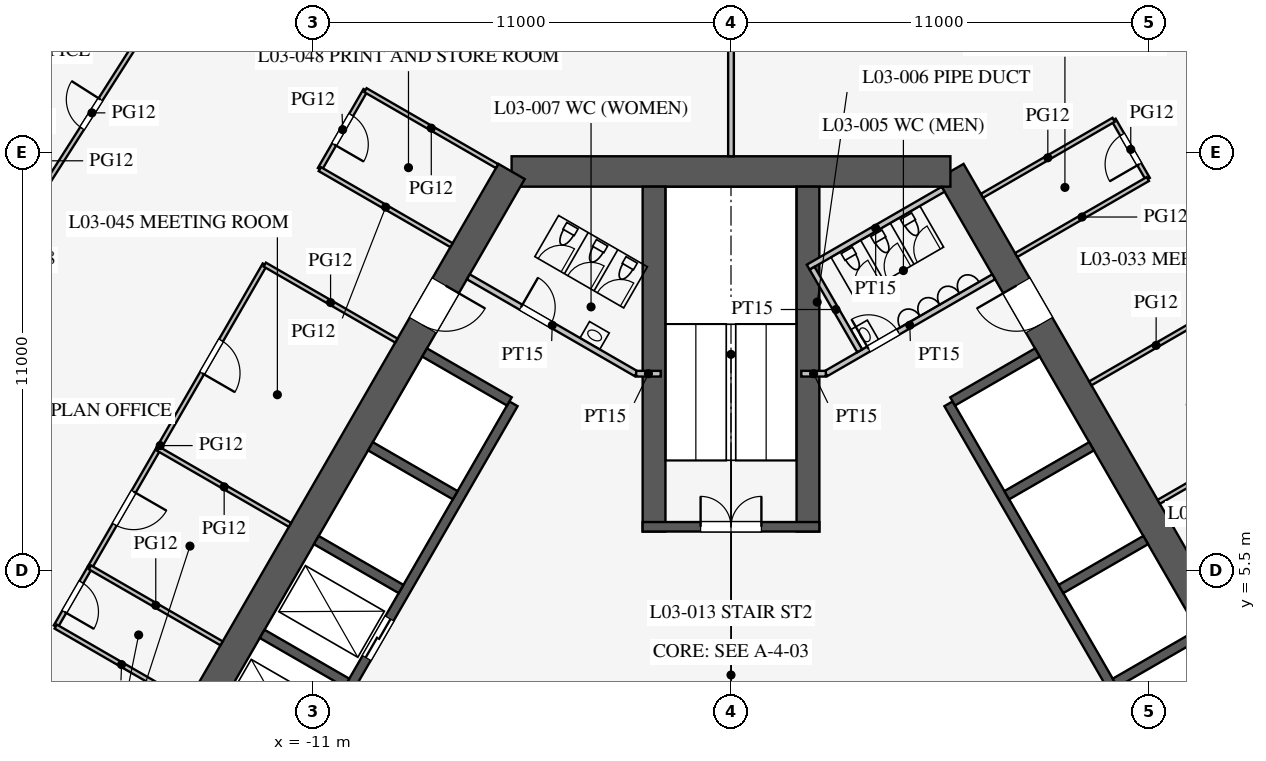
"""IFC4 building model, lengths in metres.
Left out: names, types, materials, properties, quantities, classifications, styles, units other than length and angle.
Written with IfcOpenShell. Run it as: python <this file> out.ifc"""

import sys

from ifc_helpers import new_model, si_unit, direction, frame, frame_2d, origin, place, context, subcontext, project, spatial, rectangle, extrude, element, fill, save


model = new_model("IFC4")
c1 = context("Model", 3, precision=1e-05, world=origin(), true_north=direction((0.0, 1.0)))
c2 = subcontext(c1, "Body", "Model", "MODEL_VIEW")
j1 = project(units=[si_unit("LENGTHUNIT", "METRE"), si_unit("PLANEANGLEUNIT", "RADIAN")], contexts=[c1])
p1 = place(None, origin())
s1 = spatial("IfcSite", under=j1, at=p1, CompositionType="ELEMENT")
p2 = place(p1, origin())
s2 = spatial("IfcBuilding", under=s1, at=p2, CompositionType="ELEMENT")
p3 = place(p2, frame((0.0, 0.0, 16.5)))
s3 = spatial("IfcBuildingStorey", under=s2, at=p3, CompositionType="ELEMENT", Elevation=16.5)
p4 = place(p3, frame((16.743, -3.0, 0.0), z_axis=(0.0, 0.0, 1.0), x_axis=(-0.500002442456, 0.866023993627, 0.0)))
e1 = element("IfcWall", 1, at=p4, inside=s3, PredefinedType="SHEAR", context=c2, shape_type="SweptSolid", body=[
    extrude(rectangle(XDim=21.939, YDim=0.8, at=frame_2d((10.97, 0.0))), origin(), (0.0, 0.0, 1.0), 4.2),
])
p5 = place(p4, frame((17.27, 0.0, 0.0)))
e2 = element("IfcOpeningElement", 2, at=p5, cuts=e1, PredefinedType="OPENING", context=c2, shape_type="SweptSolid", body=[
    extrude(rectangle(XDim=1.2, YDim=2.1, at=frame_2d((0.6, 1.05))), frame((0.0, 0.41, 0.0), z_axis=(0.0, -1.0, 0.0), x_axis=(1.0, 0.0, 0.0)), (0.0, 0.0, 1.0), 0.82),
])
p6 = place(p4, frame((3.47, 0.0, 0.0)))
e3 = element("IfcOpeningElement", 3, at=p6, cuts=e1, PredefinedType="OPENING", context=c2, shape_type="SweptSolid", body=[
    extrude(rectangle(XDim=1.2, YDim=2.1, at=frame_2d((0.6, 1.05))), frame((0.0, 0.41, 0.0), z_axis=(0.0, -1.0, 0.0), x_axis=(1.0, 0.0, 0.0)), (0.0, 0.0, 1.0), 0.82),
])
p7 = place(p3, frame((5.773, 16.0, 0.0), z_axis=(0.0, 0.0, 1.0), x_axis=(-1.0, 0.0, 0.0)))
e4 = element("IfcWall", 4, at=p7, inside=s3, PredefinedType="SHEAR", context=c2, shape_type="SweptSolid", body=[
    extrude(rectangle(XDim=11.547, YDim=0.8, at=frame_2d((5.773, 0.0))), origin(), (0.0, 0.0, 1.0), 4.2),
])
p8 = place(p3, frame((-5.773, 16.0, 0.0), z_axis=(0.0, 0.0, 1.0), x_axis=(-0.500002442456, -0.866023993627, 0.0)))
e5 = element("IfcWall", 5, at=p8, inside=s3, PredefinedType="SHEAR", context=c2, shape_type="SweptSolid", body=[
    extrude(rectangle(XDim=21.939, YDim=0.8, at=frame_2d((10.97, 0.0))), origin(), (0.0, 0.0, 1.0), 4.2),
])
p9 = place(p8, frame((17.27, 0.0, 0.0)))
e6 = element("IfcOpeningElement", 6, at=p9, cuts=e5, PredefinedType="OPENING", context=c2, shape_type="SweptSolid", body=[
    extrude(rectangle(XDim=1.2, YDim=2.1, at=frame_2d((0.6, 1.05))), frame((0.0, 0.41, 0.0), z_axis=(0.0, -1.0, 0.0), x_axis=(1.0, 0.0, 0.0)), (0.0, 0.0, 1.0), 0.82),
])
p10 = place(p8, frame((3.47, 0.0, 0.0)))
e7 = element("IfcOpeningElement", 7, at=p10, cuts=e5, PredefinedType="OPENING", context=c2, shape_type="SweptSolid", body=[
    extrude(rectangle(XDim=1.2, YDim=2.1, at=frame_2d((0.6, 1.05))), frame((0.0, 0.41, 0.0), z_axis=(0.0, -1.0, 0.0), x_axis=(1.0, 0.0, 0.0)), (0.0, 0.0, 1.0), 0.82),
])
p11 = place(p3, frame((11.424, 0.014, 0.0), z_axis=(0.0, 0.0, 1.0), x_axis=(-0.500001763848, 0.866024385424, 0.0)))
e8 = element("IfcWall", 8, at=p11, inside=s3, PredefinedType="SHEAR", context=c2, shape_type="SweptSolid", body=[
    extrude(rectangle(XDim=11.4, YDim=0.25, at=frame_2d((5.7, 0.0))), origin(), (0.0, 0.0, 1.0), 4.2),
])
for number, where, z_axis, x_axis in (
    (9, (10.107, 2.544, 0.0), (0.0, 0.0, 1.0), (0.866, 0.5, 0.0)),
    (10, (8.682, 5.012, 0.0), (0.0, 0.0, 1.0), (0.866, 0.5, 0.0)),
    (11, (7.257, 7.481, 0.0), (0.0, 0.0, 1.0), (0.866, 0.5, 0.0)),
):
    element("IfcWall", number, at=place(p3, frame(where, z_axis=z_axis, x_axis=x_axis)), inside=s3, PredefinedType="SHEAR", context=c2, shape_type="SweptSolid", body=[
        extrude(rectangle(XDim=2.575, YDim=0.25, at=frame_2d((1.288, 0.0))), origin(), (0.0, 0.0, 1.0), 4.2),
    ])
p12 = place(p3, frame((5.832, 9.949, 0.0), z_axis=(0.0, 0.0, 1.0), x_axis=(0.866029291668, 0.499993265928, 0.0)))
e12 = element("IfcWall", 12, at=p12, inside=s3, PredefinedType="SHEAR", context=c2, shape_type="SweptSolid", body=[
    extrude(rectangle(XDim=2.575, YDim=0.25, at=frame_2d((1.288, 0.0))), origin(), (0.0, 0.0, 1.0), 4.2),
])
p13 = place(p3, frame((-5.724, 9.886, 0.0), z_axis=(0.0, 0.0, 1.0), x_axis=(-0.500001763848, -0.866024385424, 0.0)))
e13 = element("IfcWall", 13, at=p13, inside=s3, PredefinedType="SHEAR", context=c2, shape_type="SweptSolid", body=[
    extrude(rectangle(XDim=11.4, YDim=0.25, at=frame_2d((5.7, 0.0))), origin(), (0.0, 0.0, 1.0), 4.2),
])
p14 = place(p13, frame((6.525, 0.0, 0.0)))
e14 = element("IfcOpeningElement", 14, at=p14, cuts=e13, PredefinedType="OPENING", context=c2, shape_type="SweptSolid", body=[
    extrude(rectangle(XDim=1.2, YDim=2.2, at=frame_2d((0.6, 1.1))), frame((0.0, 0.135, 0.0), z_axis=(0.0, -1.0, 0.0), x_axis=(1.0, 0.0, 0.0)), (0.0, 0.0, 1.0), 0.27),
])
p15 = place(p13, frame((9.375, 0.0, 0.0)))
e15 = element("IfcOpeningElement", 15, at=p15, cuts=e13, PredefinedType="OPENING", context=c2, shape_type="SweptSolid", body=[
    extrude(rectangle(XDim=1.2, YDim=2.2, at=frame_2d((0.6, 1.1))), frame((0.0, 0.135, 0.0), z_axis=(0.0, -1.0, 0.0), x_axis=(1.0, 0.0, 0.0)), (0.0, 0.0, 1.0), 0.27),
])
p16 = place(p3, frame((-5.832, 9.949, 0.0), z_axis=(0.0, 0.0, 1.0), x_axis=(-0.866029291668, 0.499993265928, 0.0)))
e16 = element("IfcWall", 16, at=p16, inside=s3, PredefinedType="SHEAR", context=c2, shape_type="SweptSolid", body=[
    extrude(rectangle(XDim=2.575, YDim=0.25, at=frame_2d((1.288, 0.0))), origin(), (0.0, 0.0, 1.0), 4.2),
])
for number, where, z_axis, x_axis in (
    (17, (-7.257, 7.481, 0.0), (0.0, 0.0, 1.0), (-0.866, 0.5, 0.0)),
    (18, (-8.682, 5.012, 0.0), (0.0, 0.0, 1.0), (-0.866, 0.5, 0.0)),
    (19, (-10.107, 2.544, 0.0), (0.0, 0.0, 1.0), (-0.866, 0.5, 0.0)),
):
    element("IfcWall", number, at=place(p3, frame(where, z_axis=z_axis, x_axis=x_axis)), inside=s3, PredefinedType="SHEAR", context=c2, shape_type="SweptSolid", body=[
        extrude(rectangle(XDim=2.575, YDim=0.25, at=frame_2d((1.288, 0.0))), origin(), (0.0, 0.0, 1.0), 4.2),
    ])
for number, where, z_axis, x_axis in (
    (20, (2.025, 6.525, 0.0), (0.0, 0.0, 1.0), (0.0, 1.0, 0.0)),
    (21, (-2.025, 6.525, 0.0), (0.0, 0.0, 1.0), (0.0, 1.0, 0.0)),
):
    element("IfcWall", number, at=place(p3, frame(where, z_axis=z_axis, x_axis=x_axis)), inside=s3, PredefinedType="SHEAR", context=c2, shape_type="SweptSolid", body=[
        extrude(rectangle(XDim=9.075, YDim=0.6, at=frame_2d((4.538, 0.0))), origin(), (0.0, 0.0, 1.0), 4.2),
    ])
p17 = place(p3, frame((2.325, 6.65, 0.0), z_axis=(0.0, 0.0, 1.0), x_axis=(-1.0, 0.0, 0.0)))
e22 = element("IfcWall", 22, at=p17, inside=s3, PredefinedType="SHEAR", context=c2, shape_type="SweptSolid", body=[
    extrude(rectangle(XDim=4.65, YDim=0.25, at=frame_2d((2.325, 0.0))), origin(), (0.0, 0.0, 1.0), 4.2),
])
p18 = place(p17, frame((1.525, 0.0, 0.0)))
e23 = element("IfcOpeningElement", 23, at=p18, cuts=e22, PredefinedType="OPENING", context=c2, shape_type="SweptSolid", body=[
    extrude(rectangle(XDim=1.6, YDim=2.1, at=frame_2d((0.8, 1.05))), frame((0.0, 0.135, 0.0), z_axis=(0.0, -1.0, 0.0), x_axis=(1.0, 0.0, 0.0)), (0.0, 0.0, 1.0), 0.27),
])
p19 = place(p3, frame((2.495, 10.678, 0.0), z_axis=(0.0, 0.0, 1.0), x_axis=(0.86602216432, 0.500005610874, 0.0)))
e24 = element("IfcWall", 24, at=p19, inside=s3, PredefinedType="PARTITIONING", context=c2, shape_type="SweptSolid", body=[
    extrude(rectangle(XDim=5.1, YDim=0.15, at=frame_2d((2.55, 0.0))), origin(), (0.0, 0.0, 1.0), 4.0),
])
p20 = place(p19, frame((1.3, 0.0, 0.0)))
e25 = element("IfcOpeningElement", 25, at=p20, cuts=e24, PredefinedType="OPENING", context=c2, shape_type="SweptSolid", body=[
    extrude(rectangle(XDim=0.9, YDim=2.1, at=frame_2d((0.45, 1.05))), frame((0.0, 0.085, 0.0), z_axis=(0.0, -1.0, 0.0), x_axis=(1.0, 0.0, 0.0)), (0.0, 0.0, 1.0), 0.17),
])
p21 = place(p3, frame((-2.495, 10.678, 0.0), z_axis=(0.0, 0.0, 1.0), x_axis=(-0.86602216432, 0.500005610874, 0.0)))
e26 = element("IfcWall", 26, at=p21, inside=s3, PredefinedType="PARTITIONING", context=c2, shape_type="SweptSolid", body=[
    extrude(rectangle(XDim=5.1, YDim=0.15, at=frame_2d((2.55, 0.0))), origin(), (0.0, 0.0, 1.0), 4.0),
])
p22 = place(p21, frame((2.6, 0.0, 0.0)))
e27 = element("IfcOpeningElement", 27, at=p22, cuts=e26, PredefinedType="OPENING", context=c2, shape_type="SweptSolid", body=[
    extrude(rectangle(XDim=0.9, YDim=2.1, at=frame_2d((0.45, 1.05))), frame((0.0, 0.085, 0.0), z_axis=(0.0, -1.0, 0.0), x_axis=(1.0, 0.0, 0.0)), (0.0, 0.0, 1.0), 0.17),
])
for number, where, z_axis, x_axis in (
    (28, (2.495, 10.678, 0.0), (0.0, 0.0, 1.0), (-1.0, 0.0, 0.0)),
    (29, (-2.495, 10.678, 0.0), (0.0, 0.0, 1.0), (1.0, 0.0, 0.0)),
):
    element("IfcWall", number, at=place(p3, frame(where, z_axis=z_axis, x_axis=x_axis)), inside=s3, PredefinedType="PARTITIONING", context=c2, shape_type="SweptSolid", body=[
        extrude(rectangle(XDim=0.645, YDim=0.15, at=frame_2d((0.323, 0.0))), origin(), (0.0, 0.0, 1.0), 4.0),
    ])
p23 = place(p3, frame((2.031, 13.482, 0.0), z_axis=(0.0, 0.0, 1.0), x_axis=(0.866050731258, 0.499956128963, 0.0)))
e30 = element("IfcWall", 30, at=p23, inside=s3, PredefinedType="PARTITIONING", context=c2, shape_type="SweptSolid", body=[
    extrude(rectangle(XDim=4.1, YDim=0.15, at=frame_2d((2.05, 0.0))), origin(), (0.0, 0.0, 1.0), 4.0),
])
p24 = place(p3, frame((3.389, 11.281, 0.0), z_axis=(0.0, 0.0, 1.0), x_axis=(-0.499989096993, 0.866031698547, 0.0)))
e31 = element("IfcWall", 31, at=p24, inside=s3, PredefinedType="PARTITIONING", context=c2, shape_type="SweptSolid", body=[
    extrude(rectangle(XDim=2.51, YDim=0.15, at=frame_2d((1.255, 0.0))), origin(), (0.0, 0.0, 1.0), 4.0),
])
p25 = place(p3, frame((0.0, 16.4, 0.0), z_axis=(0.0, 0.0, 1.0), x_axis=(0.0, 1.0, 0.0)))
e32 = element("IfcWall", 32, at=p25, inside=s3, PredefinedType="PARTITIONING", context=c2, shape_type="SweptSolid", body=[
    extrude(rectangle(XDim=18.25, YDim=0.15, at=frame_2d((9.125, 0.0))), origin(), (0.0, 0.0, 1.0), 2.3),
])
p26 = place(p3, frame((10.969, 15.802, 0.0), z_axis=(0.0, 0.0, 1.0), x_axis=(-0.499961193289, 0.866047807691, 0.0)))
e33 = element("IfcWall", 33, at=p26, inside=s3, PredefinedType="PARTITIONING", context=c2, shape_type="SweptSolid", body=[
    extrude(rectangle(XDim=1.8, YDim=0.12, at=frame_2d((0.9, 0.0))), origin(), (0.0, 0.0, 1.0), 2.9),
])
p27 = place(p26, frame((0.45, 0.0, 0.15)))
e34 = element("IfcOpeningElement", 34, at=p27, cuts=e33, PredefinedType="OPENING", context=c2, shape_type="SweptSolid", body=[
    extrude(rectangle(XDim=0.9, YDim=2.1, at=frame_2d((0.45, 1.05))), frame((0.0, 0.07, 0.0), z_axis=(0.0, -1.0, 0.0), x_axis=(1.0, 0.0, 0.0)), (0.0, 0.0, 1.0), 0.14),
])
for number, where, z_axis, x_axis in (
    (35, (11.255, 7.306, 0.0), (0.0, 0.0, 1.0), (0.866, 0.5, 0.0)),
    (36, (6.605, 15.36, 0.0), (0.0, 0.0, 1.0), (0.866, 0.5, 0.0)),
    (37, (9.455, 10.424, 0.0), (0.0, 0.0, 1.0), (0.866, 0.5, 0.0)),
    (38, (7.505, 13.802, 0.0), (0.0, 0.0, 1.0), (0.866, 0.5, 0.0)),
):
    element("IfcWall", number, at=place(p3, frame(where, z_axis=z_axis, x_axis=x_axis)), inside=s3, PredefinedType="PARTITIONING", context=c2, shape_type="SweptSolid", body=[
        extrude(rectangle(XDim=4.0, YDim=0.12, at=frame_2d((2.0, 0.0))), origin(), (0.0, 0.0, 1.0), 2.9),
    ])
p28 = place(p3, frame((-16.869, 5.582, 0.0), z_axis=(0.0, 0.0, 1.0), x_axis=(-0.499961193289, -0.866047807691, 0.0)))
e39 = element("IfcWall", 39, at=p28, inside=s3, PredefinedType="PARTITIONING", context=c2, shape_type="SweptSolid", body=[
    extrude(rectangle(XDim=1.8, YDim=0.12, at=frame_2d((0.9, 0.0))), origin(), (0.0, 0.0, 1.0), 2.9),
])
p29 = place(p28, frame((0.45, 0.0, 0.15)))
e40 = element("IfcOpeningElement", 40, at=p29, cuts=e39, PredefinedType="OPENING", context=c2, shape_type="SweptSolid", body=[
    extrude(rectangle(XDim=0.9, YDim=2.1, at=frame_2d((0.45, 1.05))), frame((0.0, 0.07, 0.0), z_axis=(0.0, -1.0, 0.0), x_axis=(1.0, 0.0, 0.0)), (0.0, 0.0, 1.0), 0.14),
])
p30 = place(p3, frame((-15.069, 8.7, 0.0), z_axis=(0.0, 0.0, 1.0), x_axis=(-0.500012057535, -0.866018442252, 0.0)))
e41 = element("IfcWall", 41, at=p30, inside=s3, PredefinedType="PARTITIONING", context=c2, shape_type="SweptSolid", body=[
    extrude(rectangle(XDim=3.6, YDim=0.12, at=frame_2d((1.8, 0.0))), origin(), (0.0, 0.0, 1.0), 2.9),
])
p31 = place(p30, frame((1.3, 0.0, 0.15)))
e42 = element("IfcOpeningElement", 42, at=p31, cuts=e41, PredefinedType="OPENING", context=c2, shape_type="SweptSolid", body=[
    extrude(rectangle(XDim=1.0, YDim=2.1, at=frame_2d((0.5, 1.05))), frame((0.0, 0.07, 0.0), z_axis=(0.0, -1.0, 0.0), x_axis=(1.0, 0.0, 0.0)), (0.0, 0.0, 1.0), 0.14),
])
p32 = place(p3, frame((-9.619, 18.14, 0.0), z_axis=(0.0, 0.0, 1.0), x_axis=(-0.500001309137, -0.866024647952, 0.0)))
e43 = element("IfcWall", 43, at=p32, inside=s3, PredefinedType="PARTITIONING", context=c2, shape_type="SweptSolid", body=[
    extrude(rectangle(XDim=2.4, YDim=0.12, at=frame_2d((1.2, 0.0))), origin(), (0.0, 0.0, 1.0), 2.9),
])
p33 = place(p32, frame((0.75, 0.0, 0.15)))
e44 = element("IfcOpeningElement", 44, at=p33, cuts=e43, PredefinedType="OPENING", context=c2, shape_type="SweptSolid", body=[
    extrude(rectangle(XDim=0.9, YDim=2.1, at=frame_2d((0.45, 1.05))), frame((0.0, 0.07, 0.0), z_axis=(0.0, -1.0, 0.0), x_axis=(1.0, 0.0, 0.0)), (0.0, 0.0, 1.0), 0.14),
])
p34 = place(p3, frame((-12.269, 13.55, 0.0), z_axis=(0.0, 0.0, 1.0), x_axis=(-0.49999793692, -0.866026594901, 0.0)))
e45 = element("IfcWall", 45, at=p34, inside=s3, PredefinedType="PARTITIONING", context=c2, shape_type="SweptSolid", body=[
    extrude(rectangle(XDim=5.6, YDim=0.12, at=frame_2d((2.8, 0.0))), origin(), (0.0, 0.0, 1.0), 2.9),
])
p35 = place(p34, frame((2.3, 0.0, 0.15)))
e46 = element("IfcOpeningElement", 46, at=p35, cuts=e45, PredefinedType="OPENING", context=c2, shape_type="SweptSolid", body=[
    extrude(rectangle(XDim=1.0, YDim=2.1, at=frame_2d((0.5, 1.05))), frame((0.0, 0.07, 0.0), z_axis=(0.0, -1.0, 0.0), x_axis=(1.0, 0.0, 0.0)), (0.0, 0.0, 1.0), 0.14),
])
for number, where, z_axis, x_axis in (
    (47, (-13.405, 3.582, 0.0), (0.0, 0.0, 1.0), (-0.866, 0.5, 0.0)),
    (48, (-14.305, 2.023, 0.0), (0.0, 0.0, 1.0), (-0.866, 0.5, 0.0)),
    (49, (-11.605, 6.7, 0.0), (0.0, 0.0, 1.0), (-0.866, 0.5, 0.0)),
    (50, (-6.155, 16.14, 0.0), (0.0, 0.0, 1.0), (-0.866, 0.5, 0.0)),
    (51, (-8.805, 11.55, 0.0), (0.0, 0.0, 1.0), (-0.866, 0.5, 0.0)),
    (52, (-7.355, 14.061, 0.0), (0.0, 0.0, 1.0), (-0.866, 0.5, 0.0)),
):
    element("IfcWall", number, at=place(p3, frame(where, z_axis=z_axis, x_axis=x_axis)), inside=s3, PredefinedType="PARTITIONING", context=c2, shape_type="SweptSolid", body=[
        extrude(rectangle(XDim=4.0, YDim=0.12, at=frame_2d((2.0, 0.0))), origin(), (0.0, 0.0, 1.0), 2.9),
    ])
p36 = place(p3, frame((-15.624, 19.413, 0.0), z_axis=(0.0, 0.0, 1.0), x_axis=(-0.537243691336, -0.843427066272, 0.0)))
e53 = element("IfcWall", 53, at=p36, inside=s3, PredefinedType="PARTITIONING", context=c2, shape_type="SweptSolid", body=[
    extrude(rectangle(XDim=4.504, YDim=0.12, at=frame_2d((2.252, 0.0))), origin(), (0.0, 0.0, 1.0), 2.9),
])
p37 = place(p36, frame((1.8, 0.0, 0.15)))
e54 = element("IfcOpeningElement", 54, at=p37, cuts=e53, PredefinedType="OPENING", context=c2, shape_type="SweptSolid", body=[
    extrude(rectangle(XDim=0.9, YDim=2.1, at=frame_2d((0.45, 1.05))), frame((0.0, 0.07, 0.0), z_axis=(0.0, -1.0, 0.0), x_axis=(1.0, 0.0, 0.0)), (0.0, 0.0, 1.0), 0.14),
])
p38 = place(p20, origin())
e55 = element("IfcDoor", 55, at=p38, inside=s3, OperationType="SINGLE_SWING_LEFT", PredefinedType="DOOR", context=c2, shape_type="SweptSolid", body=[
    extrude(rectangle(XDim=0.9, YDim=2.1, at=frame_2d((0.45, 1.05))), frame((0.0, 0.025, 0.0), z_axis=(0.0, -1.0, 0.0), x_axis=(1.0, 0.0, 0.0)), (0.0, 0.0, 1.0), 0.05),
])
fill(e25, e55)
p39 = place(p22, frame((0.9, 0.0, 0.0), z_axis=(0.0, 0.0, 1.0), x_axis=(-1.0, 0.0, 0.0)))
e56 = element("IfcDoor", 56, at=p39, inside=s3, OperationType="SINGLE_SWING_LEFT", PredefinedType="DOOR", context=c2, shape_type="SweptSolid", body=[
    extrude(rectangle(XDim=0.9, YDim=2.1, at=frame_2d((0.45, 1.05))), frame((0.0, 0.025, 0.0), z_axis=(0.0, -1.0, 0.0), x_axis=(1.0, 0.0, 0.0)), (0.0, 0.0, 1.0), 0.05),
])
fill(e27, e56)
p40 = place(p18, frame((1.6, 0.0, 0.0), z_axis=(0.0, 0.0, 1.0), x_axis=(-1.0, 0.0, 0.0)))
e57 = element("IfcDoor", 57, at=p40, inside=s3, OperationType="DOUBLE_DOOR_SINGLE_SWING", PredefinedType="DOOR", context=c2, shape_type="SweptSolid", body=[
    extrude(rectangle(XDim=1.6, YDim=2.1, at=frame_2d((0.8, 1.05))), frame((0.0, 0.025, 0.0), z_axis=(0.0, -1.0, 0.0), x_axis=(1.0, 0.0, 0.0)), (0.0, 0.0, 1.0), 0.05),
])
fill(e23, e57)
p41 = place(p5, origin())
e58 = element("IfcDoor", 58, at=p41, inside=s3, OperationType="SINGLE_SWING_RIGHT", PredefinedType="DOOR", context=c2, shape_type="SweptSolid", body=[
    extrude(rectangle(XDim=1.2, YDim=2.1, at=frame_2d((0.6, 1.05))), frame((0.0, 0.025, 0.0), z_axis=(0.0, -1.0, 0.0), x_axis=(1.0, 0.0, 0.0)), (0.0, 0.0, 1.0), 0.05),
])
fill(e2, e58)
p42 = place(p10, origin())
e59 = element("IfcDoor", 59, at=p42, inside=s3, OperationType="SINGLE_SWING_LEFT", PredefinedType="DOOR", context=c2, shape_type="SweptSolid", body=[
    extrude(rectangle(XDim=1.2, YDim=2.1, at=frame_2d((0.6, 1.05))), frame((0.0, 0.025, 0.0), z_axis=(0.0, -1.0, 0.0), x_axis=(1.0, 0.0, 0.0)), (0.0, 0.0, 1.0), 0.05),
])
fill(e7, e59)
p43 = place(p27, origin())
e60 = element("IfcDoor", 60, at=p43, inside=s3, OperationType="SINGLE_SWING_LEFT", PredefinedType="DOOR", context=c2, shape_type="SweptSolid", body=[
    extrude(rectangle(XDim=0.9, YDim=2.1, at=frame_2d((0.45, 1.05))), frame((0.0, 0.025, 0.0), z_axis=(0.0, -1.0, 0.0), x_axis=(1.0, 0.0, 0.0)), (0.0, 0.0, 1.0), 0.05),
])
fill(e34, e60)
p44 = place(p35, origin())
e61 = element("IfcDoor", 61, at=p44, inside=s3, OperationType="SINGLE_SWING_RIGHT", PredefinedType="DOOR", context=c2, shape_type="SweptSolid", body=[
    extrude(rectangle(XDim=1.0, YDim=2.1, at=frame_2d((0.5, 1.05))), frame((0.0, 0.025, 0.0), z_axis=(0.0, -1.0, 0.0), x_axis=(1.0, 0.0, 0.0)), (0.0, 0.0, 1.0), 0.05),
])
fill(e46, e61)
p45 = place(p31, origin())
e62 = element("IfcDoor", 62, at=p45, inside=s3, OperationType="SINGLE_SWING_LEFT", PredefinedType="DOOR", context=c2, shape_type="SweptSolid", body=[
    extrude(rectangle(XDim=1.0, YDim=2.1, at=frame_2d((0.5, 1.05))), frame((0.0, 0.025, 0.0), z_axis=(0.0, -1.0, 0.0), x_axis=(1.0, 0.0, 0.0)), (0.0, 0.0, 1.0), 0.05),
])
fill(e42, e62)
p46 = place(p29, origin())
e63 = element("IfcDoor", 63, at=p46, inside=s3, OperationType="SINGLE_SWING_RIGHT", PredefinedType="DOOR", context=c2, shape_type="SweptSolid", body=[
    extrude(rectangle(XDim=0.9, YDim=2.1, at=frame_2d((0.45, 1.05))), frame((0.0, 0.025, 0.0), z_axis=(0.0, -1.0, 0.0), x_axis=(1.0, 0.0, 0.0)), (0.0, 0.0, 1.0), 0.05),
])
fill(e40, e63)
p47 = place(p33, origin())
e64 = element("IfcDoor", 64, at=p47, inside=s3, OperationType="SINGLE_SWING_RIGHT", PredefinedType="DOOR", context=c2, shape_type="SweptSolid", body=[
    extrude(rectangle(XDim=0.9, YDim=2.1, at=frame_2d((0.45, 1.05))), frame((0.0, 0.025, 0.0), z_axis=(0.0, -1.0, 0.0), x_axis=(1.0, 0.0, 0.0)), (0.0, 0.0, 1.0), 0.05),
])
fill(e44, e64)
p48 = place(p37, frame((0.9, 0.0, 0.0), z_axis=(0.0, 0.0, 1.0), x_axis=(-1.0, 0.0, 0.0)))
e65 = element("IfcDoor", 65, at=p48, inside=s3, OperationType="SINGLE_SWING_RIGHT", PredefinedType="DOOR", context=c2, shape_type="SweptSolid", body=[
    extrude(rectangle(XDim=0.9, YDim=2.1, at=frame_2d((0.45, 1.05))), frame((0.0, 0.025, 0.0), z_axis=(0.0, -1.0, 0.0), x_axis=(1.0, 0.0, 0.0)), (0.0, 0.0, 1.0), 0.05),
])
fill(e54, e65)
p49 = place(p14, origin())
e66 = element("IfcDoor", 66, at=p49, inside=s3, OperationType="DOUBLE_DOOR_SLIDING", PredefinedType="DOOR", context=c2, shape_type="SweptSolid", body=[
    extrude(rectangle(XDim=1.2, YDim=2.2, at=frame_2d((0.6, 1.1))), frame((0.0, 0.025, 0.0), z_axis=(0.0, -1.0, 0.0), x_axis=(1.0, 0.0, 0.0)), (0.0, 0.0, 1.0), 0.05),
])
fill(e14, e66)
save(model, sys.argv[1])
